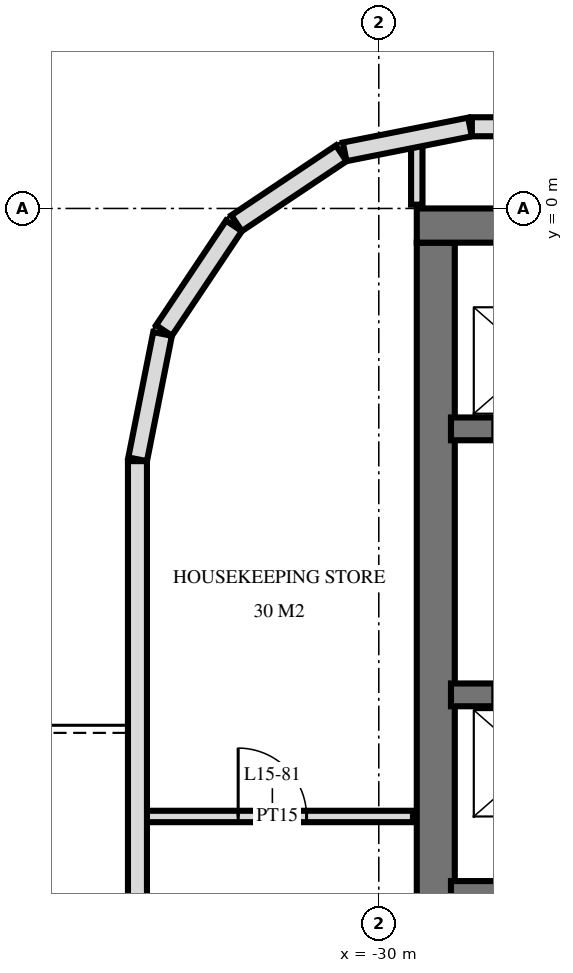
"""IFC4 building model, lengths in metres.
Left out: names, types, materials, properties, quantities, classifications, styles, units other than length and angle.
Written with IfcOpenShell. Run it as: python <this file> out.ifc"""

import sys

from ifc_helpers import new_model, si_unit, direction, frame, frame_2d, origin, place, context, subcontext, project, spatial, rectangle, extrude, element, fill, save


model = new_model("IFC4")
c1 = context("Model", 3, precision=1e-05, world=origin(), true_north=direction((0.0, 1.0)))
c2 = subcontext(c1, "Body", "Model", "MODEL_VIEW")
j1 = project(units=[si_unit("LENGTHUNIT", "METRE"), si_unit("PLANEANGLEUNIT", "RADIAN")], contexts=[c1])
p1 = place(None, origin())
s1 = spatial("IfcSite", under=j1, at=p1, CompositionType="ELEMENT")
p2 = place(p1, origin())
s2 = spatial("IfcBuilding", under=s1, at=p2, CompositionType="ELEMENT")
p3 = place(p2, frame((0.0, 0.0, 63.6)))
s3 = spatial("IfcBuildingStorey", under=s2, at=p3, CompositionType="ELEMENT", Elevation=63.6)
p4 = place(p3, frame((-29.5, -0.225, 0.0), z_axis=(0.0, 0.0, 1.0), x_axis=(1.0, 0.0, 0.0)))
e1 = element("IfcWall", 1, at=p4, inside=s3, PredefinedType="SHEAR", context=c2, shape_type="SweptSolid", body=[
    extrude(rectangle(XDim=19.5, YDim=0.45, at=frame_2d((9.75, 0.0))), origin(), (0.0, 0.0, 1.0), 3.6),
])
p5 = place(p3, frame((-29.25, -14.55, 0.0), z_axis=(0.0, 0.0, 1.0), x_axis=(0.0, 1.0, 0.0)))
e2 = element("IfcWall", 2, at=p5, inside=s3, PredefinedType="SHEAR", context=c2, shape_type="SweptSolid", body=[
    extrude(rectangle(XDim=14.1, YDim=0.5, at=frame_2d((7.05, 0.0))), origin(), (0.0, 0.0, 1.0), 3.6),
])
p6 = place(p3, frame((-29.05, -2.9, 0.0), z_axis=(0.0, 0.0, 1.0), x_axis=(1.0, 0.0, 0.0)))
e3 = element("IfcWall", 3, at=p6, inside=s3, PredefinedType="SHEAR", context=c2, shape_type="SweptSolid", body=[
    extrude(rectangle(XDim=18.7, YDim=0.3, at=frame_2d((9.35, 0.0))), origin(), (0.0, 0.0, 1.0), 3.6),
])
p7 = place(p6, frame((2.95, 0.0, 0.0)))
e4 = element("IfcOpeningElement", 4, at=p7, cuts=e3, PredefinedType="OPENING", context=c2, shape_type="SweptSolid", body=[
    extrude(rectangle(XDim=1.1, YDim=2.1, at=frame_2d((0.55, 1.05))), frame((0.0, 0.16, 0.0), z_axis=(0.0, -1.0, 0.0), x_axis=(1.0, 0.0, 0.0)), (0.0, 0.0, 1.0), 0.32),
])
p8 = place(p6, frame((0.55, 0.0, 0.0)))
e5 = element("IfcOpeningElement", 5, at=p8, cuts=e3, PredefinedType="OPENING", context=c2, shape_type="SweptSolid", body=[
    extrude(rectangle(XDim=1.1, YDim=2.1, at=frame_2d((0.55, 1.05))), frame((0.0, 0.16, 0.0), z_axis=(0.0, -1.0, 0.0), x_axis=(1.0, 0.0, 0.0)), (0.0, 0.0, 1.0), 0.32),
])
p9 = place(p6, frame((11.613, 0.0, 0.0)))
e6 = element("IfcOpeningElement", 6, at=p9, cuts=e3, PredefinedType="OPENING", context=c2, shape_type="SweptSolid", body=[
    extrude(rectangle(XDim=0.9, YDim=2.1, at=frame_2d((0.45, 1.05))), frame((0.0, 0.16, 0.0), z_axis=(0.0, -1.0, 0.0), x_axis=(1.0, 0.0, 0.0)), (0.0, 0.0, 1.0), 0.32),
])
p10 = place(p6, frame((10.188, 0.0, 0.0)))
e7 = element("IfcOpeningElement", 7, at=p10, cuts=e3, PredefinedType="OPENING", context=c2, shape_type="SweptSolid", body=[
    extrude(rectangle(XDim=0.9, YDim=2.1, at=frame_2d((0.45, 1.05))), frame((0.0, 0.16, 0.0), z_axis=(0.0, -1.0, 0.0), x_axis=(1.0, 0.0, 0.0)), (0.0, 0.0, 1.0), 0.32),
])
p11 = place(p6, frame((17.562, 0.0, 0.0)))
e8 = element("IfcOpeningElement", 8, at=p11, cuts=e3, PredefinedType="OPENING", context=c2, shape_type="SweptSolid", body=[
    extrude(rectangle(XDim=1.0, YDim=2.1, at=frame_2d((0.5, 1.05))), frame((0.0, 0.16, 0.0), z_axis=(0.0, -1.0, 0.0), x_axis=(1.0, 0.0, 0.0)), (0.0, 0.0, 1.0), 0.32),
])
p12 = place(p6, frame((16.137, 0.0, 0.0)))
e9 = element("IfcOpeningElement", 9, at=p12, cuts=e3, PredefinedType="OPENING", context=c2, shape_type="SweptSolid", body=[
    extrude(rectangle(XDim=1.0, YDim=2.1, at=frame_2d((0.5, 1.05))), frame((0.0, 0.16, 0.0), z_axis=(0.0, -1.0, 0.0), x_axis=(1.0, 0.0, 0.0)), (0.0, 0.0, 1.0), 0.32),
])
p13 = place(p6, frame((13.85, 0.0, 0.0)))
e10 = element("IfcOpeningElement", 10, at=p13, cuts=e3, PredefinedType="OPENING", context=c2, shape_type="SweptSolid", body=[
    extrude(rectangle(XDim=1.0, YDim=2.1, at=frame_2d((0.5, 1.05))), frame((0.0, 0.16, 0.0), z_axis=(0.0, -1.0, 0.0), x_axis=(1.0, 0.0, 0.0)), (0.0, 0.0, 1.0), 0.32),
])
p14 = place(p6, frame((5.6, 0.0, 0.0)))
e11 = element("IfcOpeningElement", 11, at=p14, cuts=e3, PredefinedType="OPENING", context=c2, shape_type="SweptSolid", body=[
    extrude(rectangle(XDim=1.0, YDim=2.1, at=frame_2d((0.5, 1.05))), frame((0.0, 0.16, 0.0), z_axis=(0.0, -1.0, 0.0), x_axis=(1.0, 0.0, 0.0)), (0.0, 0.0, 1.0), 0.32),
])
p15 = place(p3, frame((-29.05, -6.4, 0.0), z_axis=(0.0, 0.0, 1.0), x_axis=(1.0, 0.0, 0.0)))
e12 = element("IfcWall", 12, at=p15, inside=s3, PredefinedType="SHEAR", context=c2, shape_type="SweptSolid", body=[
    extrude(rectangle(XDim=18.7, YDim=0.3, at=frame_2d((9.35, 0.0))), origin(), (0.0, 0.0, 1.0), 3.6),
])
p16 = place(p15, frame((2.95, 0.0, 0.0)))
e13 = element("IfcOpeningElement", 13, at=p16, cuts=e12, PredefinedType="OPENING", context=c2, shape_type="SweptSolid", body=[
    extrude(rectangle(XDim=1.1, YDim=2.1, at=frame_2d((0.55, 1.05))), frame((0.0, 0.16, 0.0), z_axis=(0.0, -1.0, 0.0), x_axis=(1.0, 0.0, 0.0)), (0.0, 0.0, 1.0), 0.32),
])
p17 = place(p15, frame((0.55, 0.0, 0.0)))
e14 = element("IfcOpeningElement", 14, at=p17, cuts=e12, PredefinedType="OPENING", context=c2, shape_type="SweptSolid", body=[
    extrude(rectangle(XDim=1.1, YDim=2.1, at=frame_2d((0.55, 1.05))), frame((0.0, 0.16, 0.0), z_axis=(0.0, -1.0, 0.0), x_axis=(1.0, 0.0, 0.0)), (0.0, 0.0, 1.0), 0.32),
])
p18 = place(p15, frame((10.8, 0.0, 0.0)))
e15 = element("IfcOpeningElement", 15, at=p18, cuts=e12, PredefinedType="OPENING", context=c2, shape_type="SweptSolid", body=[
    extrude(rectangle(XDim=1.1, YDim=2.1, at=frame_2d((0.55, 1.05))), frame((0.0, 0.16, 0.0), z_axis=(0.0, -1.0, 0.0), x_axis=(1.0, 0.0, 0.0)), (0.0, 0.0, 1.0), 0.32),
])
p19 = place(p15, frame((5.6, 0.0, 0.0)))
e16 = element("IfcOpeningElement", 16, at=p19, cuts=e12, PredefinedType="OPENING", context=c2, shape_type="SweptSolid", body=[
    extrude(rectangle(XDim=1.0, YDim=2.1, at=frame_2d((0.5, 1.05))), frame((0.0, 0.16, 0.0), z_axis=(0.0, -1.0, 0.0), x_axis=(1.0, 0.0, 0.0)), (0.0, 0.0, 1.0), 0.32),
])
p20 = place(p3, frame((-29.05, -9.0, 0.0), z_axis=(0.0, 0.0, 1.0), x_axis=(1.0, 0.0, 0.0)))
e17 = element("IfcWall", 17, at=p20, inside=s3, PredefinedType="SHEAR", context=c2, shape_type="SweptSolid", body=[
    extrude(rectangle(XDim=18.7, YDim=0.3, at=frame_2d((9.35, 0.0))), origin(), (0.0, 0.0, 1.0), 3.6),
])
p21 = place(p20, frame((13.8, 0.0, 0.0)))
e18 = element("IfcOpeningElement", 18, at=p21, cuts=e17, PredefinedType="OPENING", context=c2, shape_type="SweptSolid", body=[
    extrude(rectangle(XDim=1.1, YDim=2.1, at=frame_2d((0.55, 1.05))), frame((0.0, 0.16, 0.0), z_axis=(0.0, -1.0, 0.0), x_axis=(1.0, 0.0, 0.0)), (0.0, 0.0, 1.0), 0.32),
])
p22 = place(p3, frame((28.775, 1.075, 0.0), z_axis=(0.0, 0.0, 1.0), x_axis=(-1.0, 0.0, 0.0)))
e19 = element("IfcWall", 19, at=p22, inside=s3, PredefinedType="SOLIDWALL", context=c2, shape_type="SweptSolid", body=[
    extrude(rectangle(XDim=57.551, YDim=0.25, at=frame_2d((28.775, 0.0))), origin(), (0.0, 0.0, 1.0), 3.32),
])
p23 = place(p22, frame((21.275, 0.0, 0.3)))
e20 = element("IfcOpeningElement", 20, at=p23, cuts=e19, PredefinedType="OPENING", context=c2, shape_type="SweptSolid", body=[
    extrude(rectangle(XDim=2.4, YDim=2.1, at=frame_2d((1.2, 1.05))), frame((0.0, 0.135, 0.0), z_axis=(0.0, -1.0, 0.0), x_axis=(1.0, 0.0, 0.0)), (0.0, 0.0, 1.0), 0.27),
])
p24 = place(p22, frame((24.275, 0.0, 0.3)))
e21 = element("IfcOpeningElement", 21, at=p24, cuts=e19, PredefinedType="OPENING", context=c2, shape_type="SweptSolid", body=[
    extrude(rectangle(XDim=2.4, YDim=2.1, at=frame_2d((1.2, 1.05))), frame((0.0, 0.135, 0.0), z_axis=(0.0, -1.0, 0.0), x_axis=(1.0, 0.0, 0.0)), (0.0, 0.0, 1.0), 0.27),
])
p25 = place(p3, frame((-28.8, 1.073, 0.0), z_axis=(0.0, 0.0, 1.0), x_axis=(-0.980803419081, -0.194999110559, 0.0)))
e22 = element("IfcWall", 22, at=p25, inside=s3, PredefinedType="SOLIDWALL", context=c2, shape_type="SweptSolid", body=[
    extrude(rectangle(XDim=1.681, YDim=0.25, at=frame_2d((0.841, 0.0))), origin(), (0.0, 0.0, 1.0), 3.32),
])
for number, where, z_axis, x_axis in (
    (23, (-30.494, 0.726, 0.0), (0.0, 0.0, 1.0), (-0.831, -0.556, 0.0)),
    (24, (-31.906, -0.229, 0.0), (0.0, 0.0, 1.0), (-0.556, -0.831, 0.0)),
):
    element("IfcWall", number, at=place(p3, frame(where, z_axis=z_axis, x_axis=x_axis)), inside=s3, PredefinedType="SOLIDWALL", context=c2, shape_type="SweptSolid", body=[
        extrude(rectangle(XDim=1.656, YDim=0.25, at=frame_2d((0.828, 0.0))), origin(), (0.0, 0.0, 1.0), 3.32),
    ])
p26 = place(p3, frame((-32.844, -1.651, 0.0), z_axis=(0.0, 0.0, 1.0), x_axis=(-0.19513878023, -0.980775640221, 0.0)))
e25 = element("IfcWall", 25, at=p26, inside=s3, PredefinedType="SOLIDWALL", context=c2, shape_type="SweptSolid", body=[
    extrude(rectangle(XDim=1.681, YDim=0.25, at=frame_2d((0.841, 0.0))), origin(), (0.0, 0.0, 1.0), 3.32),
])
p27 = place(p3, frame((-33.175, -3.325, 0.0), z_axis=(0.0, 0.0, 1.0), x_axis=(0.0, -1.0, 0.0)))
e26 = element("IfcWall", 26, at=p27, inside=s3, PredefinedType="SOLIDWALL", context=c2, shape_type="SweptSolid", body=[
    extrude(rectangle(XDim=21.551, YDim=0.25, at=frame_2d((10.775, 0.0))), origin(), (0.0, 0.0, 1.0), 3.32),
])
p28 = place(p27, frame((7.275, 0.0, 0.0)))
e27 = element("IfcOpeningElement", 27, at=p28, cuts=e26, PredefinedType="OPENING", context=c2, shape_type="SweptSolid", body=[
    extrude(rectangle(XDim=1.8, YDim=2.4, at=frame_2d((0.9, 1.2))), frame((0.0, 0.135, 0.0), z_axis=(0.0, -1.0, 0.0), x_axis=(1.0, 0.0, 0.0)), (0.0, 0.0, 1.0), 0.27),
])
p29 = place(p27, frame((12.075, 0.0, 0.3)))
e28 = element("IfcOpeningElement", 28, at=p29, cuts=e26, PredefinedType="OPENING", context=c2, shape_type="SweptSolid", body=[
    extrude(rectangle(XDim=1.2, YDim=2.1, at=frame_2d((0.6, 1.05))), frame((0.0, 0.135, 0.0), z_axis=(0.0, -1.0, 0.0), x_axis=(1.0, 0.0, 0.0)), (0.0, 0.0, 1.0), 0.27),
])
p30 = place(p27, frame((14.875, 0.0, 0.0)))
e29 = element("IfcOpeningElement", 29, at=p30, cuts=e26, PredefinedType="OPENING", context=c2, shape_type="SweptSolid", body=[
    extrude(rectangle(XDim=1.8, YDim=2.4, at=frame_2d((0.9, 1.2))), frame((0.0, 0.135, 0.0), z_axis=(0.0, -1.0, 0.0), x_axis=(1.0, 0.0, 0.0)), (0.0, 0.0, 1.0), 0.27),
])
p31 = place(p27, frame((18.875, 0.0, 0.0)))
e30 = element("IfcOpeningElement", 30, at=p31, cuts=e26, PredefinedType="OPENING", context=c2, shape_type="SweptSolid", body=[
    extrude(rectangle(XDim=1.8, YDim=2.4, at=frame_2d((0.9, 1.2))), frame((0.0, 0.135, 0.0), z_axis=(0.0, -1.0, 0.0), x_axis=(1.0, 0.0, 0.0)), (0.0, 0.0, 1.0), 0.27),
])
p32 = place(p3, frame((-29.5, 0.05, 0.0), z_axis=(0.0, 0.0, 1.0), x_axis=(0.0, 1.0, 0.0)))
e31 = element("IfcWall", 31, at=p32, inside=s3, PredefinedType="PARTITIONING", context=c2, shape_type="SweptSolid", body=[
    extrude(rectangle(XDim=0.827, YDim=0.15, at=frame_2d((0.414, 0.0))), origin(), (0.0, 0.0, 1.0), 3.32),
])
p33 = place(p3, frame((-33.12, -8.0, 0.0), z_axis=(0.0, 0.0, 1.0), x_axis=(1.0, 0.0, 0.0)))
e32 = element("IfcWall", 32, at=p33, inside=s3, PredefinedType="PARTITIONING", context=c2, shape_type="SweptSolid", body=[
    extrude(rectangle(XDim=3.57, YDim=0.15, at=frame_2d((1.785, 0.0))), origin(), (0.0, 0.0, 1.0), 3.32),
])
p34 = place(p33, frame((1.27, 0.0, 0.0)))
e33 = element("IfcOpeningElement", 33, at=p34, cuts=e32, PredefinedType="OPENING", context=c2, shape_type="SweptSolid", body=[
    extrude(rectangle(XDim=0.9, YDim=2.1, at=frame_2d((0.45, 1.05))), frame((0.0, 0.085, 0.0), z_axis=(0.0, -1.0, 0.0), x_axis=(1.0, 0.0, 0.0)), (0.0, 0.0, 1.0), 0.17),
])
p35 = place(p34, origin())
e34 = element("IfcDoor", 34, at=p35, inside=s3, OperationType="SINGLE_SWING_RIGHT", PredefinedType="DOOR", context=c2, shape_type="SweptSolid", body=[
    extrude(rectangle(XDim=0.9, YDim=2.1, at=frame_2d((0.45, 1.05))), frame((0.0, 0.025, 0.0), z_axis=(0.0, -1.0, 0.0), x_axis=(1.0, 0.0, 0.0)), (0.0, 0.0, 1.0), 0.05),
])
fill(e33, e34)
save(model, sys.argv[1])
